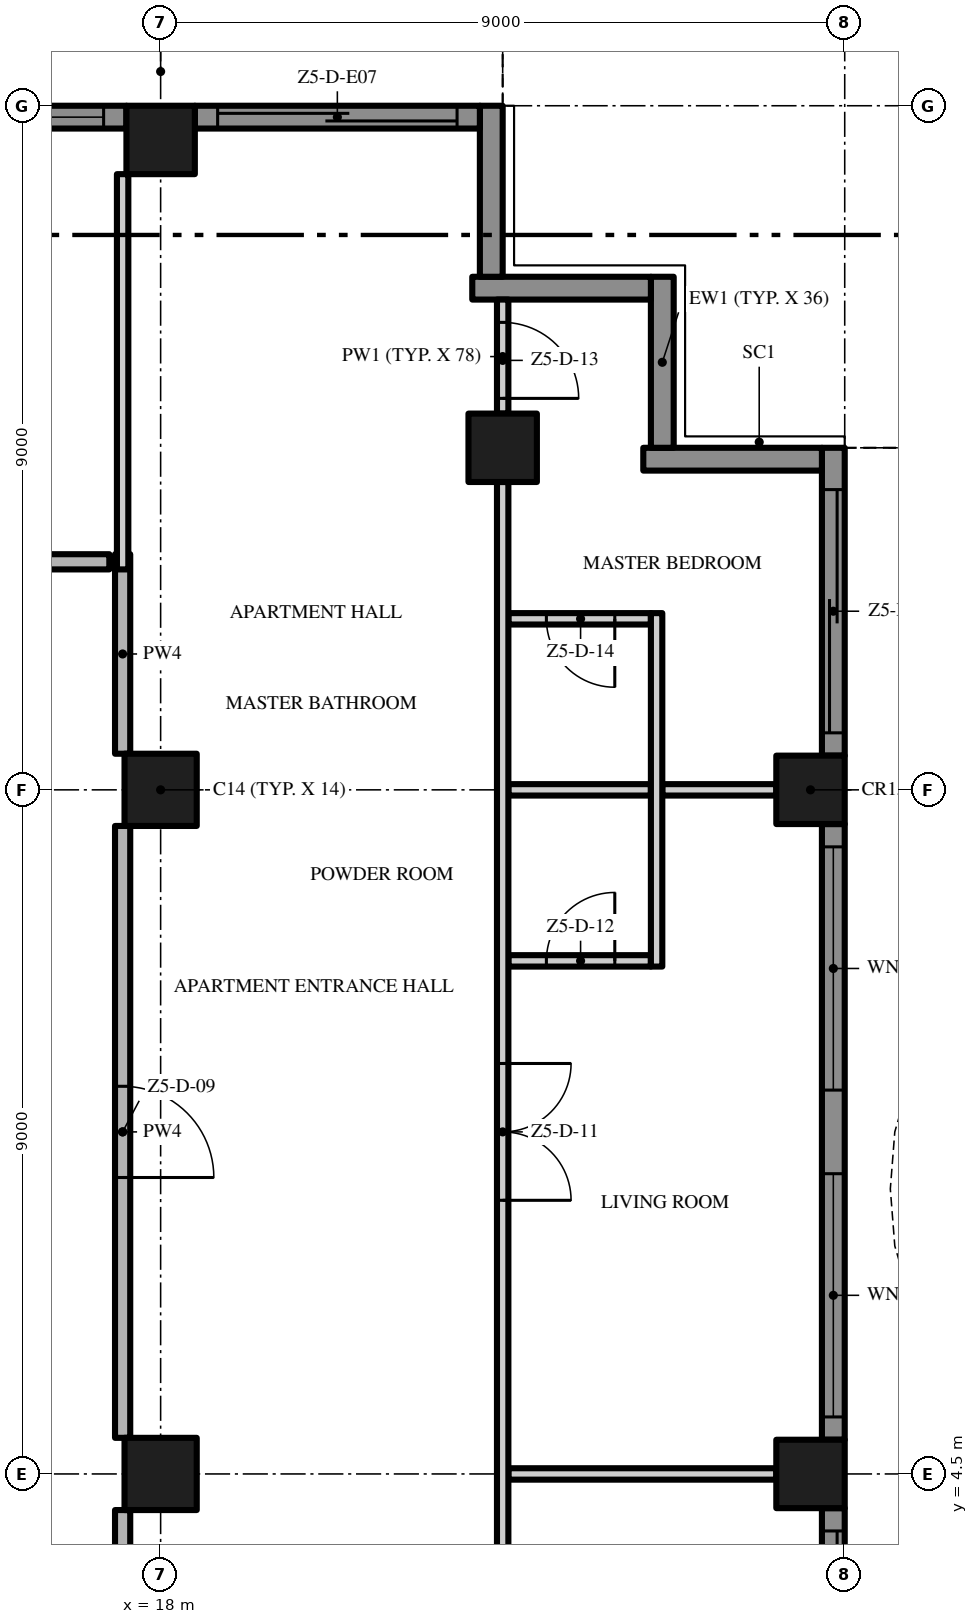
"""IFC4 building model, lengths in metres.
Left out: names, types, materials, properties, quantities, classifications, styles, units other than length and angle.
Written with IfcOpenShell. Run it as: python <this file> out.ifc"""

import sys

from ifc_helpers import new_model, si_unit, direction, frame, frame_2d, origin, origin_2d, place, context, subcontext, project, spatial, polyline, rectangle, outline, extrude, element, fill, save


model = new_model("IFC4")
c1 = context("Model", 3, precision=1e-05, world=origin(), true_north=direction((0.0, 1.0)))
c2 = subcontext(c1, "Body", "Model", "MODEL_VIEW")
j1 = project(units=[si_unit("LENGTHUNIT", "METRE"), si_unit("PLANEANGLEUNIT", "RADIAN")], contexts=[c1])
p1 = place(None, origin())
s1 = spatial("IfcSite", under=j1, at=p1, CompositionType="ELEMENT")
p2 = place(p1, origin())
s2 = spatial("IfcBuilding", under=s1, at=p2, CompositionType="ELEMENT")
p3 = place(p2, frame((0.0, 0.0, 273.0)))
s3 = spatial("IfcBuildingStorey", under=s2, at=p3, CompositionType="ELEMENT", Elevation=273.0)
p4 = place(p3, frame((18.0, 13.5, 0.0), z_axis=(0.0, 0.0, 1.0), x_axis=(1.0, 0.0, 0.0)))
e1 = element("IfcColumn", 1, at=p4, inside=s3, PredefinedType="COLUMN", context=c2, shape_type="SweptSolid", body=[
    extrude(rectangle(XDim=0.95, YDim=0.95, at=origin_2d()), origin(), (0.0, 0.0, 1.0), 3.5),
])
p5 = place(p3, frame((18.0, 22.05, 0.0), z_axis=(0.0, 0.0, 1.0), x_axis=(1.0, 0.0, 0.0)))
e2 = element("IfcColumn", 2, at=p5, inside=s3, PredefinedType="COLUMN", context=c2, shape_type="SweptSolid", body=[
    extrude(rectangle(XDim=0.9, YDim=0.9, at=origin_2d()), origin(), (0.0, 0.0, 1.0), 3.5),
])
p6 = place(p3, frame((18.0, 4.5, 0.0), z_axis=(0.0, 0.0, 1.0), x_axis=(1.0, 0.0, 0.0)))
e3 = element("IfcColumn", 3, at=p6, inside=s3, PredefinedType="COLUMN", context=c2, shape_type="SweptSolid", body=[
    extrude(rectangle(XDim=0.95, YDim=0.95, at=origin_2d()), origin(), (0.0, 0.0, 1.0), 3.5),
])
for number, where, z_axis, x_axis in (
    (4, (26.55, 13.5, 0.0), (0.0, 0.0, 1.0), (1.0, 0.0, 0.0)),
    (5, (22.5, 18.0, 0.0), (0.0, 0.0, 1.0), (1.0, 0.0, 0.0)),
    (6, (26.55, 4.5, 0.0), (0.0, 0.0, 1.0), (1.0, 0.0, 0.0)),
):
    element("IfcColumn", number, at=place(p3, frame(where, z_axis=z_axis, x_axis=x_axis)), inside=s3, PredefinedType="COLUMN", context=c2, shape_type="SweptSolid", body=[
        extrude(rectangle(XDim=0.9, YDim=0.9, at=origin_2d()), origin(), (0.0, 0.0, 1.0), 3.5),
    ])
p7 = place(p3, frame((26.85, 4.05, 0.0), z_axis=(0.0, 0.0, 1.0), x_axis=(0.0, -1.0, 0.0)))
e7 = element("IfcWall", 7, at=p7, inside=s3, PredefinedType="SOLIDWALL", context=c2, shape_type="SweptSolid", body=[
    extrude(rectangle(XDim=8.1, YDim=0.3, at=frame_2d((4.05, 0.0))), origin(), (0.0, 0.0, 1.0), 3.5),
])
p8 = place(p7, frame((4.6, 0.0, 0.45)))
e8 = element("IfcOpeningElement", 8, at=p8, cuts=e7, PredefinedType="OPENING", context=c2, shape_type="SweptSolid", body=[
    extrude(rectangle(XDim=3.2, YDim=2.65, at=frame_2d((1.6, 1.325))), frame((0.0, 0.16, 0.0), z_axis=(0.0, -1.0, 0.0), x_axis=(1.0, 0.0, 0.0)), (0.0, 0.0, 1.0), 0.32),
])
p9 = place(p7, frame((0.3, 0.0, 0.0)))
e9 = element("IfcOpeningElement", 9, at=p9, cuts=e7, PredefinedType="OPENING", context=c2, shape_type="SweptSolid", body=[
    extrude(rectangle(XDim=3.2, YDim=2.4, at=frame_2d((1.6, 1.2))), frame((0.0, 0.16, 0.0), z_axis=(0.0, -1.0, 0.0), x_axis=(1.0, 0.0, 0.0)), (0.0, 0.0, 1.0), 0.32),
])
p10 = place(p3, frame((26.85, 13.05, 0.0), z_axis=(0.0, 0.0, 1.0), x_axis=(0.0, -1.0, 0.0)))
e10 = element("IfcWall", 10, at=p10, inside=s3, PredefinedType="SOLIDWALL", context=c2, shape_type="SweptSolid", body=[
    extrude(rectangle(XDim=8.1, YDim=0.3, at=frame_2d((4.05, 0.0))), origin(), (0.0, 0.0, 1.0), 3.5),
])
p11 = place(p10, frame((4.6, 0.0, 0.45)))
e11 = element("IfcOpeningElement", 11, at=p11, cuts=e10, PredefinedType="OPENING", context=c2, shape_type="SweptSolid", body=[
    extrude(rectangle(XDim=3.2, YDim=2.65, at=frame_2d((1.6, 1.325))), frame((0.0, 0.16, 0.0), z_axis=(0.0, -1.0, 0.0), x_axis=(1.0, 0.0, 0.0)), (0.0, 0.0, 1.0), 0.32),
])
p12 = place(p10, frame((0.3, 0.0, 0.45)))
e12 = element("IfcOpeningElement", 12, at=p12, cuts=e10, PredefinedType="OPENING", context=c2, shape_type="SweptSolid", body=[
    extrude(rectangle(XDim=3.2, YDim=2.65, at=frame_2d((1.6, 1.325))), frame((0.0, 0.16, 0.0), z_axis=(0.0, -1.0, 0.0), x_axis=(1.0, 0.0, 0.0)), (0.0, 0.0, 1.0), 0.32),
])
p13 = place(p3, frame((26.85, 18.0, 0.0), z_axis=(0.0, 0.0, 1.0), x_axis=(0.0, -1.0, 0.0)))
e13 = element("IfcWall", 13, at=p13, inside=s3, PredefinedType="SOLIDWALL", context=c2, shape_type="SweptSolid", body=[
    extrude(rectangle(XDim=4.05, YDim=0.3, at=frame_2d((2.025, 0.0))), origin(), (0.0, 0.0, 1.0), 3.5),
])
p14 = place(p13, frame((0.55, 0.0, 0.0)))
e14 = element("IfcOpeningElement", 14, at=p14, cuts=e13, PredefinedType="OPENING", context=c2, shape_type="SweptSolid", body=[
    extrude(rectangle(XDim=3.2, YDim=2.4, at=frame_2d((1.6, 1.2))), frame((0.0, 0.16, 0.0), z_axis=(0.0, -1.0, 0.0), x_axis=(1.0, 0.0, 0.0)), (0.0, 0.0, 1.0), 0.32),
])
p15 = place(p3, frame((24.35, 17.85, 0.0), z_axis=(0.0, 0.0, 1.0), x_axis=(1.0, 0.0, 0.0)))
e15 = element("IfcWall", 15, at=p15, inside=s3, PredefinedType="SOLIDWALL", context=c2, shape_type="SweptSolid", body=[
    extrude(rectangle(XDim=2.35, YDim=0.3, at=frame_2d((1.175, 0.0))), origin(), (0.0, 0.0, 1.0), 3.5),
])
p16 = place(p3, frame((24.6, 20.25, 0.0), z_axis=(0.0, 0.0, 1.0), x_axis=(0.0, -1.0, 0.0)))
e16 = element("IfcWall", 16, at=p16, inside=s3, PredefinedType="SOLIDWALL", context=c2, shape_type="SweptSolid", body=[
    extrude(rectangle(XDim=2.25, YDim=0.3, at=frame_2d((1.125, 0.0))), origin(), (0.0, 0.0, 1.0), 3.5),
])
p17 = place(p3, frame((22.1, 20.1, 0.0), z_axis=(0.0, 0.0, 1.0), x_axis=(1.0, 0.0, 0.0)))
e17 = element("IfcWall", 17, at=p17, inside=s3, PredefinedType="SOLIDWALL", context=c2, shape_type="SweptSolid", body=[
    extrude(rectangle(XDim=2.35, YDim=0.3, at=frame_2d((1.175, 0.0))), origin(), (0.0, 0.0, 1.0), 3.5),
])
p18 = place(p3, frame((22.35, 22.5, 0.0), z_axis=(0.0, 0.0, 1.0), x_axis=(0.0, -1.0, 0.0)))
e18 = element("IfcWall", 18, at=p18, inside=s3, PredefinedType="SOLIDWALL", context=c2, shape_type="SweptSolid", body=[
    extrude(rectangle(XDim=2.25, YDim=0.3, at=frame_2d((1.125, 0.0))), origin(), (0.0, 0.0, 1.0), 3.5),
])
p19 = place(p3, frame((18.45, 22.35, 0.0), z_axis=(0.0, 0.0, 1.0), x_axis=(1.0, 0.0, 0.0)))
e19 = element("IfcWall", 19, at=p19, inside=s3, PredefinedType="SOLIDWALL", context=c2, shape_type="SweptSolid", body=[
    extrude(rectangle(XDim=3.75, YDim=0.3, at=frame_2d((1.875, 0.0))), origin(), (0.0, 0.0, 1.0), 3.5),
])
p20 = place(p19, frame((0.3, 0.0, 0.0)))
e20 = element("IfcOpeningElement", 20, at=p20, cuts=e19, PredefinedType="OPENING", context=c2, shape_type="SweptSolid", body=[
    extrude(rectangle(XDim=3.15, YDim=2.4, at=frame_2d((1.575, 1.2))), frame((0.0, 0.16, 0.0), z_axis=(0.0, -1.0, 0.0), x_axis=(1.0, 0.0, 0.0)), (0.0, 0.0, 1.0), 0.32),
])
p21 = place(p3, frame((13.5, 22.35, 0.0), z_axis=(0.0, 0.0, 1.0), x_axis=(1.0, 0.0, 0.0)))
e21 = element("IfcWall", 21, at=p21, inside=s3, PredefinedType="SOLIDWALL", context=c2, shape_type="SweptSolid", body=[
    extrude(rectangle(XDim=4.05, YDim=0.3, at=frame_2d((2.025, 0.0))), origin(), (0.0, 0.0, 1.0), 3.5),
])
p22 = place(p21, frame((0.55, 0.0, 0.45)))
e22 = element("IfcOpeningElement", 22, at=p22, cuts=e21, PredefinedType="OPENING", context=c2, shape_type="SweptSolid", body=[
    extrude(rectangle(XDim=3.2, YDim=2.65, at=frame_2d((1.6, 1.325))), frame((0.0, 0.16, 0.0), z_axis=(0.0, -1.0, 0.0), x_axis=(1.0, 0.0, 0.0)), (0.0, 0.0, 1.0), 0.32),
])
p23 = place(p3, origin())
e23 = element("IfcWall", 23, at=p23, inside=s3, PredefinedType="USERDEFINED", context=c2, shape_type="SweptSolid", body=[
    extrude(outline(polyline([(28.8, -18.0), (29.505, -16.5), (29.941, -15.0), (30.0, -14.25), (29.941, -13.5), (29.505, -12.0), (28.8, -10.5), (28.095, -9.0), (27.659, -7.5), (27.6, -6.75), (27.659, -6.0), (28.095, -4.5), (28.8, -3.0), (29.505, -1.5), (29.941, 0.0), (30.0, 0.75), (29.941, 1.5), (29.505, 3.0), (28.8, 4.5), (28.095, 6.0), (27.659, 7.5), (27.6, 8.25), (27.659, 9.0), (28.095, 10.5), (28.8, 12.0), (29.505, 13.5), (29.941, 15.0), (30.0, 15.75), (29.941, 16.5), (29.505, 18.0), (29.265, 17.93), (29.694, 16.455), (29.749, 15.75), (29.694, 15.045), (29.271, 13.589), (28.574, 12.106), (27.86, 10.589), (27.411, 9.045), (27.349, 8.25), (27.411, 7.455), (27.86, 5.911), (28.574, 4.394), (29.271, 2.911), (29.694, 1.455), (29.749, 0.75), (29.694, 0.045), (29.271, -1.411), (28.574, -2.894), (27.86, -4.411), (27.411, -5.955), (27.349, -6.75), (27.411, -7.545), (27.86, -9.089), (28.574, -10.606), (29.271, -12.089), (29.694, -13.545), (29.749, -14.25), (29.694, -14.955), (29.271, -16.411), (28.574, -17.894), (28.8, -18.0)])), origin(), (0.0, 0.0, 1.0), 0.9),
])
p24 = place(p3, frame((22.575, 4.5, 0.0), z_axis=(0.0, 0.0, 1.0), x_axis=(1.0, 0.0, 0.0)))
e24 = element("IfcWall", 24, at=p24, inside=s3, PredefinedType="PARTITIONING", context=c2, shape_type="SweptSolid", body=[
    extrude(rectangle(XDim=3.525, YDim=0.15, at=frame_2d((1.762, 0.0))), origin(), (0.0, 0.0, 1.0), 3.5),
])
p25 = place(p3, frame((22.575, 11.25, 0.0), z_axis=(0.0, 0.0, 1.0), x_axis=(1.0, 0.0, 0.0)))
e25 = element("IfcWall", 25, at=p25, inside=s3, PredefinedType="PARTITIONING", context=c2, shape_type="SweptSolid", body=[
    extrude(rectangle(XDim=1.875, YDim=0.15, at=frame_2d((0.938, 0.0))), origin(), (0.0, 0.0, 1.0), 3.5),
])
p26 = place(p25, frame((0.5, 0.0, 0.0)))
e26 = element("IfcOpeningElement", 26, at=p26, cuts=e25, PredefinedType="OPENING", context=c2, shape_type="SweptSolid", body=[
    extrude(rectangle(XDim=0.9, YDim=2.1, at=frame_2d((0.45, 1.05))), frame((0.0, 0.085, 0.0), z_axis=(0.0, -1.0, 0.0), x_axis=(1.0, 0.0, 0.0)), (0.0, 0.0, 1.0), 0.17),
])
p27 = place(p3, frame((22.575, 13.5, 0.0), z_axis=(0.0, 0.0, 1.0), x_axis=(1.0, 0.0, 0.0)))
e27 = element("IfcWall", 27, at=p27, inside=s3, PredefinedType="PARTITIONING", context=c2, shape_type="SweptSolid", body=[
    extrude(rectangle(XDim=1.875, YDim=0.15, at=frame_2d((0.938, 0.0))), origin(), (0.0, 0.0, 1.0), 3.5),
])
p28 = place(p3, frame((24.6, 13.5, 0.0), z_axis=(0.0, 0.0, 1.0), x_axis=(1.0, 0.0, 0.0)))
e28 = element("IfcWall", 28, at=p28, inside=s3, PredefinedType="PARTITIONING", context=c2, shape_type="SweptSolid", body=[
    extrude(rectangle(XDim=1.5, YDim=0.15, at=frame_2d((0.75, 0.0))), origin(), (0.0, 0.0, 1.0), 3.5),
])
p29 = place(p3, frame((24.45, 15.75, 0.0), z_axis=(0.0, 0.0, 1.0), x_axis=(-1.0, 0.0, 0.0)))
e29 = element("IfcWall", 29, at=p29, inside=s3, PredefinedType="PARTITIONING", context=c2, shape_type="SweptSolid", body=[
    extrude(rectangle(XDim=1.875, YDim=0.15, at=frame_2d((0.938, 0.0))), origin(), (0.0, 0.0, 1.0), 3.5),
])
p30 = place(p29, frame((0.475, 0.0, 0.0)))
e30 = element("IfcOpeningElement", 30, at=p30, cuts=e29, PredefinedType="OPENING", context=c2, shape_type="SweptSolid", body=[
    extrude(rectangle(XDim=0.9, YDim=2.1, at=frame_2d((0.45, 1.05))), frame((0.0, 0.085, 0.0), z_axis=(0.0, -1.0, 0.0), x_axis=(1.0, 0.0, 0.0)), (0.0, 0.0, 1.0), 0.17),
])
p31 = place(p3, frame((13.5, 16.5, 0.0), z_axis=(0.0, 0.0, 1.0), x_axis=(1.0, 0.0, 0.0)))
e31 = element("IfcWall", 31, at=p31, inside=s3, PredefinedType="PARTITIONING", context=c2, shape_type="SweptSolid", body=[
    extrude(rectangle(XDim=3.825, YDim=0.2, at=frame_2d((1.913, 0.0))), origin(), (0.0, 0.0, 1.0), 3.5),
])
p32 = place(p31, frame((1.55, 0.0, 0.0)))
e32 = element("IfcOpeningElement", 32, at=p32, cuts=e31, PredefinedType="OPENING", context=c2, shape_type="SweptSolid", body=[
    extrude(rectangle(XDim=0.9, YDim=2.1, at=frame_2d((0.45, 1.05))), frame((0.0, 0.11, 0.0), z_axis=(0.0, -1.0, 0.0), x_axis=(1.0, 0.0, 0.0)), (0.0, 0.0, 1.0), 0.22),
])
p33 = place(p3, frame((17.5, -0.2, 0.0), z_axis=(0.0, 0.0, 1.0), x_axis=(0.0, 1.0, 0.0)))
e33 = element("IfcWall", 33, at=p33, inside=s3, PredefinedType="PARTITIONING", context=c2, shape_type="SweptSolid", body=[
    extrude(rectangle(XDim=4.225, YDim=0.2, at=frame_2d((2.112, 0.0))), origin(), (0.0, 0.0, 1.0), 3.5),
])
p34 = place(p3, frame((17.5, 13.025, 0.0), z_axis=(0.0, 0.0, 1.0), x_axis=(0.0, -1.0, 0.0)))
e34 = element("IfcWall", 34, at=p34, inside=s3, PredefinedType="PARTITIONING", context=c2, shape_type="SweptSolid", body=[
    extrude(rectangle(XDim=8.05, YDim=0.2, at=frame_2d((4.025, 0.0))), origin(), (0.0, 0.0, 1.0), 3.5),
])
p35 = place(p34, frame((3.425, 0.0, 0.0)))
e35 = element("IfcOpeningElement", 35, at=p35, cuts=e34, PredefinedType="OPENING", context=c2, shape_type="SweptSolid", body=[
    extrude(rectangle(XDim=1.2, YDim=2.4, at=frame_2d((0.6, 1.2))), frame((0.0, 0.11, 0.0), z_axis=(0.0, -1.0, 0.0), x_axis=(1.0, 0.0, 0.0)), (0.0, 0.0, 1.0), 0.22),
])
p36 = place(p3, frame((17.5, 13.975, 0.0), z_axis=(0.0, 0.0, 1.0), x_axis=(0.0, 1.0, 0.0)))
e36 = element("IfcWall", 36, at=p36, inside=s3, PredefinedType="PARTITIONING", context=c2, shape_type="SweptSolid", body=[
    extrude(rectangle(XDim=2.625, YDim=0.2, at=frame_2d((1.312, 0.0))), origin(), (0.0, 0.0, 1.0), 3.5),
])
p37 = place(p3, frame((17.5, 16.4, 0.0), z_axis=(0.0, 0.0, 1.0), x_axis=(0.0, 1.0, 0.0)))
e37 = element("IfcWall", 37, at=p37, inside=s3, PredefinedType="PARTITIONING", context=c2, shape_type="SweptSolid", body=[
    extrude(rectangle(XDim=5.2, YDim=0.15, at=frame_2d((2.6, 0.0))), origin(), (0.0, 0.0, 1.0), 3.5),
])
p38 = place(p3, frame((22.5, 17.55, 0.0), z_axis=(0.0, 0.0, 1.0), x_axis=(0.0, -1.0, 0.0)))
e38 = element("IfcWall", 38, at=p38, inside=s3, PredefinedType="PARTITIONING", context=c2, shape_type="SweptSolid", body=[
    extrude(rectangle(XDim=17.45, YDim=0.15, at=frame_2d((8.725, 0.0))), origin(), (0.0, 0.0, 1.0), 3.5),
])
p39 = place(p38, frame((14.8, 0.0, 0.0)))
e39 = element("IfcOpeningElement", 39, at=p39, cuts=e38, PredefinedType="OPENING", context=c2, shape_type="SweptSolid", body=[
    extrude(rectangle(XDim=1.0, YDim=2.4, at=frame_2d((0.5, 1.2))), frame((0.0, 0.085, 0.0), z_axis=(0.0, -1.0, 0.0), x_axis=(1.0, 0.0, 0.0)), (0.0, 0.0, 1.0), 0.17),
])
p40 = place(p38, frame((7.65, 0.0, 0.0)))
e40 = element("IfcOpeningElement", 40, at=p40, cuts=e38, PredefinedType="OPENING", context=c2, shape_type="SweptSolid", body=[
    extrude(rectangle(XDim=1.8, YDim=2.4, at=frame_2d((0.9, 1.2))), frame((0.0, 0.085, 0.0), z_axis=(0.0, -1.0, 0.0), x_axis=(1.0, 0.0, 0.0)), (0.0, 0.0, 1.0), 0.17),
])
p41 = place(p3, frame((22.5, 19.95, 0.0), z_axis=(0.0, 0.0, 1.0), x_axis=(0.0, -1.0, 0.0)))
e41 = element("IfcWall", 41, at=p41, inside=s3, PredefinedType="PARTITIONING", context=c2, shape_type="SweptSolid", body=[
    extrude(rectangle(XDim=1.5, YDim=0.15, at=frame_2d((0.75, 0.0))), origin(), (0.0, 0.0, 1.0), 3.5),
])
p42 = place(p41, frame((0.3, 0.0, 0.0)))
e42 = element("IfcOpeningElement", 42, at=p42, cuts=e41, PredefinedType="OPENING", context=c2, shape_type="SweptSolid", body=[
    extrude(rectangle(XDim=1.0, YDim=2.4, at=frame_2d((0.5, 1.2))), frame((0.0, 0.085, 0.0), z_axis=(0.0, -1.0, 0.0), x_axis=(1.0, 0.0, 0.0)), (0.0, 0.0, 1.0), 0.17),
])
p43 = place(p3, frame((24.525, 11.175, 0.0), z_axis=(0.0, 0.0, 1.0), x_axis=(0.0, 1.0, 0.0)))
e43 = element("IfcWall", 43, at=p43, inside=s3, PredefinedType="PARTITIONING", context=c2, shape_type="SweptSolid", body=[
    extrude(rectangle(XDim=4.65, YDim=0.15, at=frame_2d((2.325, 0.0))), origin(), (0.0, 0.0, 1.0), 3.5),
])
p44 = place(p9, origin())
e44 = element("IfcDoor", 44, at=p44, inside=s3, OperationType="SINGLE_SWING_LEFT", PredefinedType="DOOR", context=c2, shape_type="SweptSolid", body=[
    extrude(rectangle(XDim=3.2, YDim=2.4, at=frame_2d((1.6, 1.2))), frame((0.0, 0.025, 0.0), z_axis=(0.0, -1.0, 0.0), x_axis=(1.0, 0.0, 0.0)), (0.0, 0.0, 1.0), 0.05),
])
fill(e9, e44)
p45 = place(p11, origin())
e45 = element("IfcWindow", 45, at=p45, inside=s3, PartitioningType="SINGLE_PANEL", PredefinedType="WINDOW", context=c2, shape_type="SweptSolid", body=[
    extrude(rectangle(XDim=3.2, YDim=2.65, at=frame_2d((1.6, 1.325))), frame((0.0, 0.03, 0.0), z_axis=(0.0, -1.0, 0.0), x_axis=(1.0, 0.0, 0.0)), (0.0, 0.0, 1.0), 0.06),
])
fill(e11, e45)
p46 = place(p12, origin())
e46 = element("IfcWindow", 46, at=p46, inside=s3, PartitioningType="SINGLE_PANEL", PredefinedType="WINDOW", context=c2, shape_type="SweptSolid", body=[
    extrude(rectangle(XDim=3.2, YDim=2.65, at=frame_2d((1.6, 1.325))), frame((0.0, 0.03, 0.0), z_axis=(0.0, -1.0, 0.0), x_axis=(1.0, 0.0, 0.0)), (0.0, 0.0, 1.0), 0.06),
])
fill(e12, e46)
p47 = place(p14, origin())
e47 = element("IfcDoor", 47, at=p47, inside=s3, OperationType="SINGLE_SWING_LEFT", PredefinedType="DOOR", context=c2, shape_type="SweptSolid", body=[
    extrude(rectangle(XDim=3.2, YDim=2.4, at=frame_2d((1.6, 1.2))), frame((0.0, 0.025, 0.0), z_axis=(0.0, -1.0, 0.0), x_axis=(1.0, 0.0, 0.0)), (0.0, 0.0, 1.0), 0.05),
])
fill(e14, e47)
p48 = place(p20, origin())
e48 = element("IfcDoor", 48, at=p48, inside=s3, OperationType="SINGLE_SWING_LEFT", PredefinedType="DOOR", context=c2, shape_type="SweptSolid", body=[
    extrude(rectangle(XDim=3.15, YDim=2.4, at=frame_2d((1.575, 1.2))), frame((0.0, 0.025, 0.0), z_axis=(0.0, -1.0, 0.0), x_axis=(1.0, 0.0, 0.0)), (0.0, 0.0, 1.0), 0.05),
])
fill(e20, e48)
p49 = place(p22, origin())
e49 = element("IfcWindow", 49, at=p49, inside=s3, PartitioningType="SINGLE_PANEL", PredefinedType="WINDOW", context=c2, shape_type="SweptSolid", body=[
    extrude(rectangle(XDim=3.2, YDim=2.65, at=frame_2d((1.6, 1.325))), frame((0.0, 0.03, 0.0), z_axis=(0.0, -1.0, 0.0), x_axis=(1.0, 0.0, 0.0)), (0.0, 0.0, 1.0), 0.06),
])
fill(e22, e49)
p50 = place(p35, origin())
e50 = element("IfcDoor", 50, at=p50, inside=s3, OperationType="SINGLE_SWING_RIGHT", PredefinedType="DOOR", context=c2, shape_type="SweptSolid", body=[
    extrude(rectangle(XDim=1.2, YDim=2.4, at=frame_2d((0.6, 1.2))), frame((0.0, 0.025, 0.0), z_axis=(0.0, -1.0, 0.0), x_axis=(1.0, 0.0, 0.0)), (0.0, 0.0, 1.0), 0.05),
])
fill(e35, e50)
p51 = place(p40, origin())
e51 = element("IfcDoor", 51, at=p51, inside=s3, OperationType="DOUBLE_DOOR_SINGLE_SWING", PredefinedType="DOOR", context=c2, shape_type="SweptSolid", body=[
    extrude(rectangle(XDim=1.8, YDim=2.4, at=frame_2d((0.9, 1.2))), frame((0.0, 0.025, 0.0), z_axis=(0.0, -1.0, 0.0), x_axis=(1.0, 0.0, 0.0)), (0.0, 0.0, 1.0), 0.05),
])
fill(e40, e51)
p52 = place(p26, origin())
e52 = element("IfcDoor", 52, at=p52, inside=s3, OperationType="SINGLE_SWING_RIGHT", PredefinedType="DOOR", context=c2, shape_type="SweptSolid", body=[
    extrude(rectangle(XDim=0.9, YDim=2.1, at=frame_2d((0.45, 1.05))), frame((0.0, 0.025, 0.0), z_axis=(0.0, -1.0, 0.0), x_axis=(1.0, 0.0, 0.0)), (0.0, 0.0, 1.0), 0.05),
])
fill(e26, e52)
p53 = place(p42, origin())
e53 = element("IfcDoor", 53, at=p53, inside=s3, OperationType="SINGLE_SWING_RIGHT", PredefinedType="DOOR", context=c2, shape_type="SweptSolid", body=[
    extrude(rectangle(XDim=1.0, YDim=2.4, at=frame_2d((0.5, 1.2))), frame((0.0, 0.025, 0.0), z_axis=(0.0, -1.0, 0.0), x_axis=(1.0, 0.0, 0.0)), (0.0, 0.0, 1.0), 0.05),
])
fill(e42, e53)
p54 = place(p30, origin())
e54 = element("IfcDoor", 54, at=p54, inside=s3, OperationType="SINGLE_SWING_LEFT", PredefinedType="DOOR", context=c2, shape_type="SweptSolid", body=[
    extrude(rectangle(XDim=0.9, YDim=2.1, at=frame_2d((0.45, 1.05))), frame((0.0, 0.025, 0.0), z_axis=(0.0, -1.0, 0.0), x_axis=(1.0, 0.0, 0.0)), (0.0, 0.0, 1.0), 0.05),
])
fill(e30, e54)
save(model, sys.argv[1])
